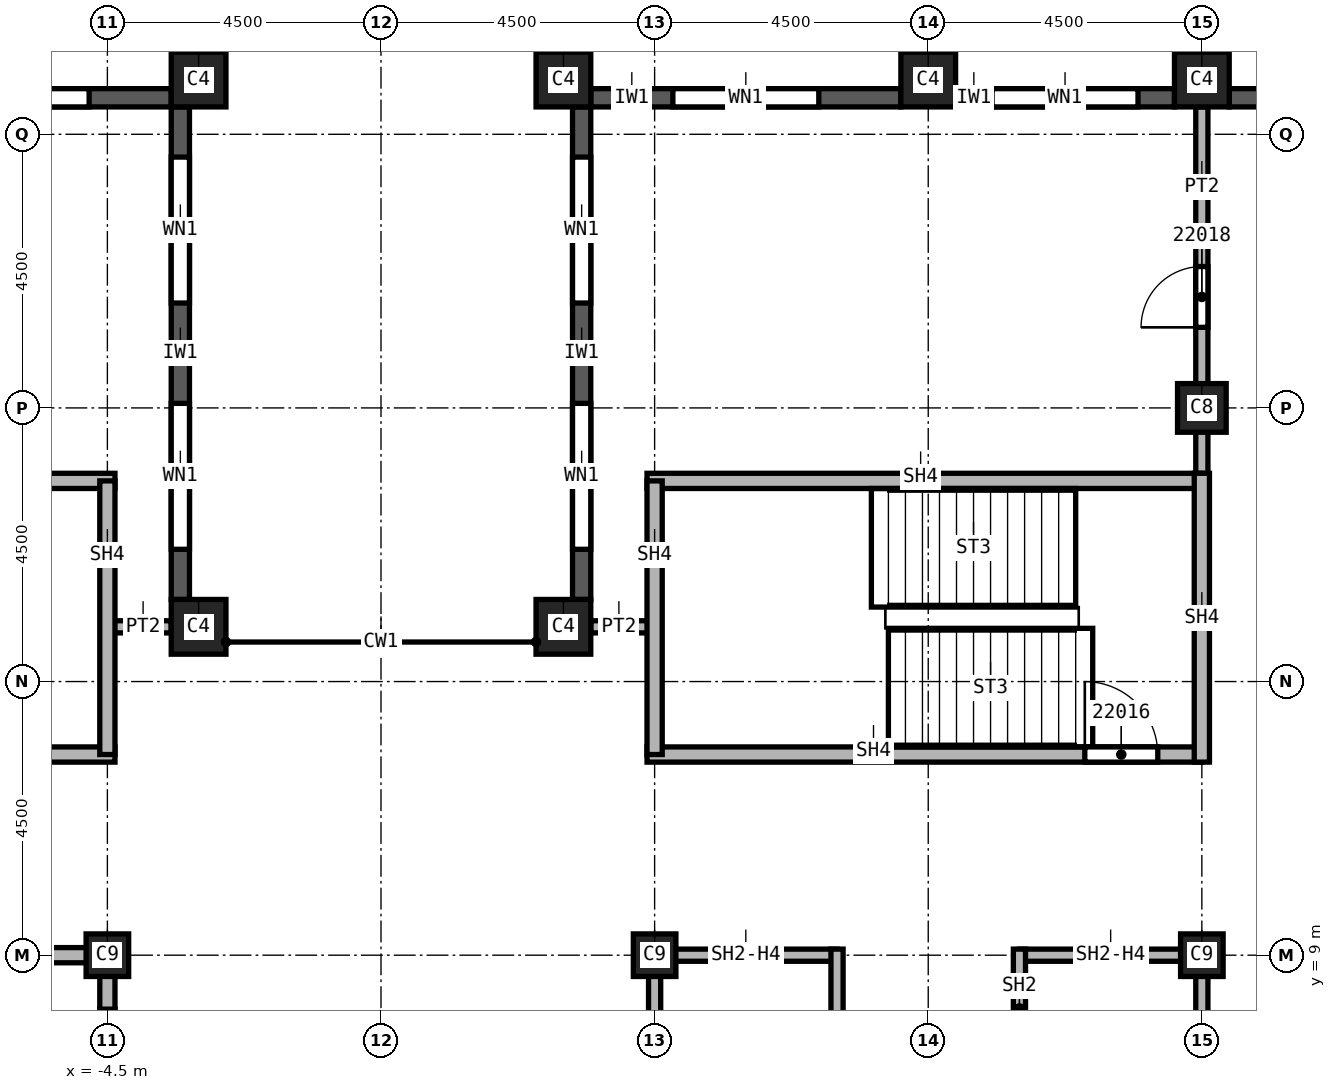
"""IFC4 building model, lengths in metres.
Left out: names, types, materials, properties, quantities, classifications, styles, units other than length and angle.
Written with IfcOpenShell. Run it as: python <this file> out.ifc"""

import sys

from ifc_helpers import new_model, si_unit, direction, frame, frame_2d, origin, origin_2d, place, context, subcontext, project, spatial, rectangle, extrude, element, fill, save


model = new_model("IFC4")
c1 = context("Model", 3, precision=1e-05, world=origin(), true_north=direction((0.0, 1.0)))
c2 = subcontext(c1, "Body", "Model", "MODEL_VIEW")
j1 = project(units=[si_unit("LENGTHUNIT", "METRE"), si_unit("PLANEANGLEUNIT", "RADIAN")], contexts=[c1])
p1 = place(None, origin())
s1 = spatial("IfcSite", under=j1, at=p1, CompositionType="ELEMENT")
p2 = place(p1, origin())
s2 = spatial("IfcBuilding", under=s1, at=p2, CompositionType="ELEMENT")
p3 = place(p2, frame((0.0, 0.0, 312.0)))
s3 = spatial("IfcBuildingStorey", under=s2, at=p3, CompositionType="ELEMENT", Elevation=312.0)
p4 = place(p3, frame((13.5, 18.0, 0.0), z_axis=(0.0, 0.0, 1.0), x_axis=(1.0, 0.0, 0.0)))
e1 = element("IfcColumn", 1, at=p4, inside=s3, PredefinedType="COLUMN", context=c2, shape_type="SweptSolid", body=[
    extrude(rectangle(XDim=0.8, YDim=0.8, at=origin_2d()), origin(), (0.0, 0.0, 1.0), 3.74),
])
for number, where, z_axis, x_axis in (
    (2, (4.5, 9.0, 0.0), (0.0, 0.0, 1.0), (1.0, 0.0, 0.0)),
    (3, (13.5, 9.0, 0.0), (0.0, 0.0, 1.0), (1.0, 0.0, 0.0)),
    (4, (-4.5, 9.0, 0.0), (0.0, 0.0, 1.0), (1.0, 0.0, 0.0)),
):
    element("IfcColumn", number, at=place(p3, frame(where, z_axis=z_axis, x_axis=x_axis)), inside=s3, PredefinedType="COLUMN", context=c2, shape_type="SweptSolid", body=[
        extrude(rectangle(XDim=0.7, YDim=0.7, at=origin_2d()), origin(), (0.0, 0.0, 1.0), 3.74),
    ])
for number, where, z_axis, x_axis in (
    (5, (3.0, 23.4, 0.0), (0.0, 0.0, 1.0), (1.0, 0.0, 0.0)),
    (6, (9.0, 23.4, 0.0), (0.0, 0.0, 1.0), (1.0, 0.0, 0.0)),
    (7, (13.5, 23.4, 0.0), (0.0, 0.0, 1.0), (1.0, 0.0, 0.0)),
    (8, (-3.0, 23.4, 0.0), (0.0, 0.0, 1.0), (1.0, 0.0, 0.0)),
    (9, (3.0, 14.4, 0.0), (0.0, 0.0, 1.0), (1.0, 0.0, 0.0)),
    (10, (-3.0, 14.4, 0.0), (0.0, 0.0, 1.0), (1.0, 0.0, 0.0)),
):
    element("IfcColumn", number, at=place(p3, frame(where, z_axis=z_axis, x_axis=x_axis)), inside=s3, PredefinedType="COLUMN", context=c2, shape_type="SweptSolid", body=[
        extrude(rectangle(XDim=0.9, YDim=0.9, at=origin_2d()), origin(), (0.0, 0.0, 1.0), 3.74),
    ])
p5 = place(p3, frame((17.55, 23.1, 0.0), z_axis=(0.0, 0.0, 1.0), x_axis=(-1.0, 0.0, 0.0)))
e11 = element("IfcWall", 11, at=p5, inside=s3, PredefinedType="SOLIDWALL", context=c2, shape_type="SweptSolid", body=[
    extrude(rectangle(XDim=3.6, YDim=0.3, at=frame_2d((1.8, 0.0))), origin(), (0.0, 0.0, 1.0), 3.14),
])
p6 = place(p5, frame((0.775, 0.0, 0.8)))
e12 = element("IfcOpeningElement", 12, at=p6, cuts=e11, PredefinedType="OPENING", context=c2, shape_type="SweptSolid", body=[
    extrude(rectangle(XDim=1.0, YDim=1.95, at=frame_2d((0.5, 0.975))), frame((0.0, 0.15, 0.0), z_axis=(0.0, -1.0, 0.0), x_axis=(1.0, 0.0, 0.0)), (0.0, 0.0, 1.0), 0.3),
])
p7 = place(p5, frame((2.375, 0.0, 0.8)))
e13 = element("IfcOpeningElement", 13, at=p7, cuts=e11, PredefinedType="OPENING", context=c2, shape_type="SweptSolid", body=[
    extrude(rectangle(XDim=0.6, YDim=1.95, at=frame_2d((0.3, 0.975))), frame((0.0, 0.15, 0.0), z_axis=(0.0, -1.0, 0.0), x_axis=(1.0, 0.0, 0.0)), (0.0, 0.0, 1.0), 0.3),
])
p8 = place(p3, frame((13.05, 23.1, 0.0), z_axis=(0.0, 0.0, 1.0), x_axis=(-1.0, 0.0, 0.0)))
e14 = element("IfcWall", 14, at=p8, inside=s3, PredefinedType="SOLIDWALL", context=c2, shape_type="SweptSolid", body=[
    extrude(rectangle(XDim=3.6, YDim=0.3, at=frame_2d((1.8, 0.0))), origin(), (0.0, 0.0, 1.0), 3.14),
])
p9 = place(p8, frame((0.6, 0.0, 0.8)))
e15 = element("IfcOpeningElement", 15, at=p9, cuts=e14, PredefinedType="OPENING", context=c2, shape_type="SweptSolid", body=[
    extrude(rectangle(XDim=2.4, YDim=1.95, at=frame_2d((1.2, 0.975))), frame((0.0, 0.15, 0.0), z_axis=(0.0, -1.0, 0.0), x_axis=(1.0, 0.0, 0.0)), (0.0, 0.0, 1.0), 0.3),
])
p10 = place(p3, frame((8.55, 23.1, 0.0), z_axis=(0.0, 0.0, 1.0), x_axis=(-1.0, 0.0, 0.0)))
e16 = element("IfcWall", 16, at=p10, inside=s3, PredefinedType="SOLIDWALL", context=c2, shape_type="SweptSolid", body=[
    extrude(rectangle(XDim=5.1, YDim=0.3, at=frame_2d((2.55, 0.0))), origin(), (0.0, 0.0, 1.0), 3.14),
])
p11 = place(p10, frame((1.35, 0.0, 0.8)))
e17 = element("IfcOpeningElement", 17, at=p11, cuts=e16, PredefinedType="OPENING", context=c2, shape_type="SweptSolid", body=[
    extrude(rectangle(XDim=2.4, YDim=1.95, at=frame_2d((1.2, 0.975))), frame((0.0, 0.15, 0.0), z_axis=(0.0, -1.0, 0.0), x_axis=(1.0, 0.0, 0.0)), (0.0, 0.0, 1.0), 0.3),
])
p12 = place(p3, frame((3.3, 22.95, 0.0), z_axis=(0.0, 0.0, 1.0), x_axis=(0.0, -1.0, 0.0)))
e18 = element("IfcWall", 18, at=p12, inside=s3, PredefinedType="SOLIDWALL", context=c2, shape_type="SweptSolid", body=[
    extrude(rectangle(XDim=8.1, YDim=0.3, at=frame_2d((4.05, 0.0))), origin(), (0.0, 0.0, 1.0), 3.14),
])
p13 = place(p12, frame((0.825, 0.0, 0.8)))
e19 = element("IfcOpeningElement", 19, at=p13, cuts=e18, PredefinedType="OPENING", context=c2, shape_type="SweptSolid", body=[
    extrude(rectangle(XDim=2.4, YDim=1.95, at=frame_2d((1.2, 0.975))), frame((0.0, 0.15, 0.0), z_axis=(0.0, -1.0, 0.0), x_axis=(1.0, 0.0, 0.0)), (0.0, 0.0, 1.0), 0.3),
])
p14 = place(p12, frame((4.875, 0.0, 0.8)))
e20 = element("IfcOpeningElement", 20, at=p14, cuts=e18, PredefinedType="OPENING", context=c2, shape_type="SweptSolid", body=[
    extrude(rectangle(XDim=2.4, YDim=1.95, at=frame_2d((1.2, 0.975))), frame((0.0, 0.15, 0.0), z_axis=(0.0, -1.0, 0.0), x_axis=(1.0, 0.0, 0.0)), (0.0, 0.0, 1.0), 0.3),
])
p15 = place(p3, frame((-3.3, 14.85, 0.0), z_axis=(0.0, 0.0, 1.0), x_axis=(0.0, 1.0, 0.0)))
e21 = element("IfcWall", 21, at=p15, inside=s3, PredefinedType="SOLIDWALL", context=c2, shape_type="SweptSolid", body=[
    extrude(rectangle(XDim=8.1, YDim=0.3, at=frame_2d((4.05, 0.0))), origin(), (0.0, 0.0, 1.0), 3.14),
])
p16 = place(p15, frame((0.825, 0.0, 0.8)))
e22 = element("IfcOpeningElement", 22, at=p16, cuts=e21, PredefinedType="OPENING", context=c2, shape_type="SweptSolid", body=[
    extrude(rectangle(XDim=2.4, YDim=1.95, at=frame_2d((1.2, 0.975))), frame((0.0, 0.15, 0.0), z_axis=(0.0, -1.0, 0.0), x_axis=(1.0, 0.0, 0.0)), (0.0, 0.0, 1.0), 0.3),
])
p17 = place(p15, frame((4.875, 0.0, 0.8)))
e23 = element("IfcOpeningElement", 23, at=p17, cuts=e21, PredefinedType="OPENING", context=c2, shape_type="SweptSolid", body=[
    extrude(rectangle(XDim=2.4, YDim=1.95, at=frame_2d((1.2, 0.975))), frame((0.0, 0.15, 0.0), z_axis=(0.0, -1.0, 0.0), x_axis=(1.0, 0.0, 0.0)), (0.0, 0.0, 1.0), 0.3),
])
p18 = place(p3, frame((-3.45, 23.1, 0.0), z_axis=(0.0, 0.0, 1.0), x_axis=(-1.0, 0.0, 0.0)))
e24 = element("IfcWall", 24, at=p18, inside=s3, PredefinedType="SOLIDWALL", context=c2, shape_type="SweptSolid", body=[
    extrude(rectangle(XDim=5.1, YDim=0.3, at=frame_2d((2.55, 0.0))), origin(), (0.0, 0.0, 1.0), 3.14),
])
p19 = place(p18, frame((1.35, 0.0, 0.8)))
e25 = element("IfcOpeningElement", 25, at=p19, cuts=e24, PredefinedType="OPENING", context=c2, shape_type="SweptSolid", body=[
    extrude(rectangle(XDim=2.4, YDim=1.95, at=frame_2d((1.2, 0.975))), frame((0.0, 0.15, 0.0), z_axis=(0.0, -1.0, 0.0), x_axis=(1.0, 0.0, 0.0)), (0.0, 0.0, 1.0), 0.3),
])
for number, where, z_axis, x_axis in (
    (26, (-4.5, 14.4, 0.0), (0.0, 0.0, 1.0), (1.0, 0.0, 0.0)),
    (27, (3.45, 14.4, 0.0), (0.0, 0.0, 1.0), (1.0, 0.0, 0.0)),
):
    element("IfcWall", number, at=place(p3, frame(where, z_axis=z_axis, x_axis=x_axis)), inside=s3, PredefinedType="PARTITIONING", context=c2, shape_type="SweptSolid", body=[
        extrude(rectangle(XDim=1.05, YDim=0.2, at=frame_2d((0.525, 0.0))), origin(), (0.0, 0.0, 1.0), 3.74),
    ])
p20 = place(p3, frame((13.5, 16.675, 0.0), z_axis=(0.0, 0.0, 1.0), x_axis=(0.0, 1.0, 0.0)))
e28 = element("IfcWall", 28, at=p20, inside=s3, PredefinedType="PARTITIONING", context=c2, shape_type="SweptSolid", body=[
    extrude(rectangle(XDim=6.275, YDim=0.2, at=frame_2d((3.137, 0.0))), origin(), (0.0, 0.0, 1.0), 3.74),
])
p21 = place(p20, frame((2.65, 0.0, 0.0)))
e29 = element("IfcOpeningElement", 29, at=p21, cuts=e28, PredefinedType="OPENING", context=c2, shape_type="SweptSolid", body=[
    extrude(rectangle(XDim=1.0, YDim=2.1, at=frame_2d((0.5, 1.05))), frame((0.0, 0.1, 0.0), z_axis=(0.0, -1.0, 0.0), x_axis=(1.0, 0.0, 0.0)), (0.0, 0.0, 1.0), 0.2),
])
p22 = place(p3, frame((4.5, -6.0, 0.0), z_axis=(0.0, 0.0, 1.0), x_axis=(0.0, 1.0, 0.0)))
e30 = element("IfcWall", 30, at=p22, inside=s3, PredefinedType="SOLIDWALL", context=c2, shape_type="SweptSolid", body=[
    extrude(rectangle(XDim=15.1, YDim=0.2, at=frame_2d((7.55, 0.0))), origin(), (0.0, 0.0, 1.0), 3.062),
])
p23 = place(p22, frame((3.1, 0.0, 0.0)))
e31 = element("IfcOpeningElement", 31, at=p23, cuts=e30, PredefinedType="OPENING", context=c2, shape_type="SweptSolid", body=[
    extrude(rectangle(XDim=1.1, YDim=2.1, at=frame_2d((0.55, 1.05))), frame((0.0, 0.1, 0.0), z_axis=(0.0, -1.0, 0.0), x_axis=(1.0, 0.0, 0.0)), (0.0, 0.0, 1.0), 0.2),
])
p24 = place(p22, frame((9.7, 0.0, 0.0)))
e32 = element("IfcOpeningElement", 32, at=p24, cuts=e30, PredefinedType="OPENING", context=c2, shape_type="SweptSolid", body=[
    extrude(rectangle(XDim=1.1, YDim=2.1, at=frame_2d((0.55, 1.05))), frame((0.0, 0.1, 0.0), z_axis=(0.0, -1.0, 0.0), x_axis=(1.0, 0.0, 0.0)), (0.0, 0.0, 1.0), 0.2),
])
p25 = place(p3, frame((4.5, 9.0, 0.0), z_axis=(0.0, 0.0, 1.0), x_axis=(1.0, 0.0, 0.0)))
e33 = element("IfcWall", 33, at=p25, inside=s3, PredefinedType="SOLIDWALL", context=c2, shape_type="SweptSolid", body=[
    extrude(rectangle(XDim=3.0, YDim=0.2, at=frame_2d((1.5, 0.0))), origin(), (0.0, 0.0, 1.0), 3.062),
])
p26 = place(p3, frame((7.5, 9.1, 0.0), z_axis=(0.0, 0.0, 1.0), x_axis=(0.0, -1.0, 0.0)))
e34 = element("IfcWall", 34, at=p26, inside=s3, PredefinedType="SOLIDWALL", context=c2, shape_type="SweptSolid", body=[
    extrude(rectangle(XDim=6.225, YDim=0.2, at=frame_2d((3.113, 0.0))), origin(), (0.0, 0.0, 1.0), 3.74),
])
p27 = place(p3, frame((10.5, 9.0, 0.0), z_axis=(0.0, 0.0, 1.0), x_axis=(1.0, 0.0, 0.0)))
e35 = element("IfcWall", 35, at=p27, inside=s3, PredefinedType="SOLIDWALL", context=c2, shape_type="SweptSolid", body=[
    extrude(rectangle(XDim=3.0, YDim=0.2, at=frame_2d((1.5, 0.0))), origin(), (0.0, 0.0, 1.0), 3.062),
])
p28 = place(p3, frame((10.5, 9.1, 0.0), z_axis=(0.0, 0.0, 1.0), x_axis=(0.0, -1.0, 0.0)))
e36 = element("IfcWall", 36, at=p28, inside=s3, PredefinedType="SOLIDWALL", context=c2, shape_type="SweptSolid", body=[
    extrude(rectangle(XDim=3.225, YDim=0.2, at=frame_2d((1.613, 0.0))), origin(), (0.0, 0.0, 1.0), 3.74),
])
p29 = place(p28, frame((1.75, 0.0, 0.0)))
e37 = element("IfcOpeningElement", 37, at=p29, cuts=e36, PredefinedType="OPENING", context=c2, shape_type="SweptSolid", body=[
    extrude(rectangle(XDim=1.1, YDim=2.1, at=frame_2d((0.55, 1.05))), frame((0.0, 0.1, 0.0), z_axis=(0.0, -1.0, 0.0), x_axis=(1.0, 0.0, 0.0)), (0.0, 0.0, 1.0), 0.2),
])
p30 = place(p3, frame((13.5, 9.1, 0.0), z_axis=(0.0, 0.0, 1.0), x_axis=(0.0, -1.0, 0.0)))
e38 = element("IfcWall", 38, at=p30, inside=s3, PredefinedType="SOLIDWALL", context=c2, shape_type="SweptSolid", body=[
    extrude(rectangle(XDim=3.1, YDim=0.2, at=frame_2d((1.55, 0.0))), origin(), (0.0, 0.0, 1.0), 3.062),
])
p31 = place(p3, frame((-7.5, 9.0, 0.0), z_axis=(0.0, 0.0, 1.0), x_axis=(1.0, 0.0, 0.0)))
e39 = element("IfcWall", 39, at=p31, inside=s3, PredefinedType="SOLIDWALL", context=c2, shape_type="SweptSolid", body=[
    extrude(rectangle(XDim=3.0, YDim=0.25, at=frame_2d((1.5, 0.0))), origin(), (0.0, 0.0, 1.0), 3.062),
])
p32 = place(p3, frame((-4.5, 9.125, 0.0), z_axis=(0.0, 0.0, 1.0), x_axis=(0.0, -1.0, 0.0)))
e40 = element("IfcWall", 40, at=p32, inside=s3, PredefinedType="SOLIDWALL", context=c2, shape_type="SweptSolid", body=[
    extrude(rectangle(XDim=3.125, YDim=0.25, at=frame_2d((1.562, 0.0))), origin(), (0.0, 0.0, 1.0), 3.062),
])
p33 = place(p32, frame((1.012, 0.0, 0.0)))
e41 = element("IfcOpeningElement", 41, at=p33, cuts=e40, PredefinedType="OPENING", context=c2, shape_type="SweptSolid", body=[
    extrude(rectangle(XDim=1.1, YDim=2.1, at=frame_2d((0.55, 1.05))), frame((0.0, 0.125, 0.0), z_axis=(0.0, -1.0, 0.0), x_axis=(1.0, 0.0, 0.0)), (0.0, 0.0, 1.0), 0.25),
])
p34 = place(p3, frame((-13.5, 12.3, 0.0), z_axis=(0.0, 0.0, 1.0), x_axis=(1.0, 0.0, 0.0)))
e42 = element("IfcWall", 42, at=p34, inside=s3, PredefinedType="SOLIDWALL", context=c2, shape_type="SweptSolid", body=[
    extrude(rectangle(XDim=9.125, YDim=0.25, at=frame_2d((4.562, 0.0))), origin(), (0.0, 0.0, 1.0), 3.74),
])
p35 = place(p34, frame((0.6, 0.0, 0.0)))
e43 = element("IfcOpeningElement", 43, at=p35, cuts=e42, PredefinedType="OPENING", context=c2, shape_type="SweptSolid", body=[
    extrude(rectangle(XDim=1.2, YDim=2.1, at=frame_2d((0.6, 1.05))), frame((0.0, 0.125, 0.0), z_axis=(0.0, -1.0, 0.0), x_axis=(1.0, 0.0, 0.0)), (0.0, 0.0, 1.0), 0.25),
])
p36 = place(p3, frame((-13.5, 16.8, 0.0), z_axis=(0.0, 0.0, 1.0), x_axis=(1.0, 0.0, 0.0)))
e44 = element("IfcWall", 44, at=p36, inside=s3, PredefinedType="SOLIDWALL", context=c2, shape_type="SweptSolid", body=[
    extrude(rectangle(XDim=9.125, YDim=0.25, at=frame_2d((4.562, 0.0))), origin(), (0.0, 0.0, 1.0), 3.74),
])
p37 = place(p3, frame((-4.5, 16.8, 0.0), z_axis=(0.0, 0.0, 1.0), x_axis=(0.0, -1.0, 0.0)))
e45 = element("IfcWall", 45, at=p37, inside=s3, PredefinedType="SOLIDWALL", context=c2, shape_type="SweptSolid", body=[
    extrude(rectangle(XDim=4.5, YDim=0.25, at=frame_2d((2.25, 0.0))), origin(), (0.0, 0.0, 1.0), 3.74),
])
p38 = place(p3, frame((4.375, 12.3, 0.0), z_axis=(0.0, 0.0, 1.0), x_axis=(1.0, 0.0, 0.0)))
e46 = element("IfcWall", 46, at=p38, inside=s3, PredefinedType="SOLIDWALL", context=c2, shape_type="SweptSolid", body=[
    extrude(rectangle(XDim=9.125, YDim=0.25, at=frame_2d((4.562, 0.0))), origin(), (0.0, 0.0, 1.0), 3.74),
])
p39 = place(p38, frame((7.2, 0.0, 0.0)))
e47 = element("IfcOpeningElement", 47, at=p39, cuts=e46, PredefinedType="OPENING", context=c2, shape_type="SweptSolid", body=[
    extrude(rectangle(XDim=1.2, YDim=2.1, at=frame_2d((0.6, 1.05))), frame((0.0, 0.125, 0.0), z_axis=(0.0, -1.0, 0.0), x_axis=(1.0, 0.0, 0.0)), (0.0, 0.0, 1.0), 0.25),
])
p40 = place(p3, frame((4.375, 16.8, 0.0), z_axis=(0.0, 0.0, 1.0), x_axis=(1.0, 0.0, 0.0)))
e48 = element("IfcWall", 48, at=p40, inside=s3, PredefinedType="SOLIDWALL", context=c2, shape_type="SweptSolid", body=[
    extrude(rectangle(XDim=9.125, YDim=0.25, at=frame_2d((4.562, 0.0))), origin(), (0.0, 0.0, 1.0), 3.74),
])
p41 = place(p3, frame((4.5, 12.3, 0.0), z_axis=(0.0, 0.0, 1.0), x_axis=(0.0, 1.0, 0.0)))
e49 = element("IfcWall", 49, at=p41, inside=s3, PredefinedType="SOLIDWALL", context=c2, shape_type="SweptSolid", body=[
    extrude(rectangle(XDim=4.5, YDim=0.25, at=frame_2d((2.25, 0.0))), origin(), (0.0, 0.0, 1.0), 3.74),
])
p42 = place(p3, frame((13.5, 12.175, 0.0), z_axis=(0.0, 0.0, 1.0), x_axis=(0.0, 1.0, 0.0)))
e50 = element("IfcWall", 50, at=p42, inside=s3, PredefinedType="SOLIDWALL", context=c2, shape_type="SweptSolid", body=[
    extrude(rectangle(XDim=4.75, YDim=0.25, at=frame_2d((2.375, 0.0))), origin(), (0.0, 0.0, 1.0), 3.74),
])
p43 = place(p9, origin())
e51 = element("IfcWindow", 51, at=p43, inside=s3, PartitioningType="SINGLE_PANEL", PredefinedType="WINDOW", context=c2, shape_type="SweptSolid", body=[
    extrude(rectangle(XDim=2.4, YDim=1.95, at=frame_2d((1.2, 0.975))), frame((0.0, 0.03, 0.0), z_axis=(0.0, -1.0, 0.0), x_axis=(1.0, 0.0, 0.0)), (0.0, 0.0, 1.0), 0.06),
])
fill(e15, e51)
p44 = place(p11, origin())
e52 = element("IfcWindow", 52, at=p44, inside=s3, PartitioningType="SINGLE_PANEL", PredefinedType="WINDOW", context=c2, shape_type="SweptSolid", body=[
    extrude(rectangle(XDim=2.4, YDim=1.95, at=frame_2d((1.2, 0.975))), frame((0.0, 0.03, 0.0), z_axis=(0.0, -1.0, 0.0), x_axis=(1.0, 0.0, 0.0)), (0.0, 0.0, 1.0), 0.06),
])
fill(e17, e52)
p45 = place(p13, origin())
e53 = element("IfcWindow", 53, at=p45, inside=s3, PartitioningType="SINGLE_PANEL", PredefinedType="WINDOW", context=c2, shape_type="SweptSolid", body=[
    extrude(rectangle(XDim=2.4, YDim=1.95, at=frame_2d((1.2, 0.975))), frame((0.0, 0.03, 0.0), z_axis=(0.0, -1.0, 0.0), x_axis=(1.0, 0.0, 0.0)), (0.0, 0.0, 1.0), 0.06),
])
fill(e19, e53)
p46 = place(p14, origin())
e54 = element("IfcWindow", 54, at=p46, inside=s3, PartitioningType="SINGLE_PANEL", PredefinedType="WINDOW", context=c2, shape_type="SweptSolid", body=[
    extrude(rectangle(XDim=2.4, YDim=1.95, at=frame_2d((1.2, 0.975))), frame((0.0, 0.03, 0.0), z_axis=(0.0, -1.0, 0.0), x_axis=(1.0, 0.0, 0.0)), (0.0, 0.0, 1.0), 0.06),
])
fill(e20, e54)
p47 = place(p16, origin())
e55 = element("IfcWindow", 55, at=p47, inside=s3, PartitioningType="SINGLE_PANEL", PredefinedType="WINDOW", context=c2, shape_type="SweptSolid", body=[
    extrude(rectangle(XDim=2.4, YDim=1.95, at=frame_2d((1.2, 0.975))), frame((0.0, 0.03, 0.0), z_axis=(0.0, -1.0, 0.0), x_axis=(1.0, 0.0, 0.0)), (0.0, 0.0, 1.0), 0.06),
])
fill(e22, e55)
p48 = place(p17, origin())
e56 = element("IfcWindow", 56, at=p48, inside=s3, PartitioningType="SINGLE_PANEL", PredefinedType="WINDOW", context=c2, shape_type="SweptSolid", body=[
    extrude(rectangle(XDim=2.4, YDim=1.95, at=frame_2d((1.2, 0.975))), frame((0.0, 0.03, 0.0), z_axis=(0.0, -1.0, 0.0), x_axis=(1.0, 0.0, 0.0)), (0.0, 0.0, 1.0), 0.06),
])
fill(e23, e56)
p49 = place(p19, origin())
e57 = element("IfcWindow", 57, at=p49, inside=s3, PartitioningType="SINGLE_PANEL", PredefinedType="WINDOW", context=c2, shape_type="SweptSolid", body=[
    extrude(rectangle(XDim=2.4, YDim=1.95, at=frame_2d((1.2, 0.975))), frame((0.0, 0.03, 0.0), z_axis=(0.0, -1.0, 0.0), x_axis=(1.0, 0.0, 0.0)), (0.0, 0.0, 1.0), 0.06),
])
fill(e25, e57)
p50 = place(p39, origin())
e58 = element("IfcDoor", 58, at=p50, inside=s3, OperationType="SINGLE_SWING_LEFT", PredefinedType="DOOR", context=c2, shape_type="SweptSolid", body=[
    extrude(rectangle(XDim=1.2, YDim=2.1, at=frame_2d((0.6, 1.05))), frame((0.0, 0.025, 0.0), z_axis=(0.0, -1.0, 0.0), x_axis=(1.0, 0.0, 0.0)), (0.0, 0.0, 1.0), 0.05),
])
fill(e47, e58)
p51 = place(p21, origin())
e59 = element("IfcDoor", 59, at=p51, inside=s3, OperationType="SINGLE_SWING_LEFT", PredefinedType="DOOR", context=c2, shape_type="SweptSolid", body=[
    extrude(rectangle(XDim=1.0, YDim=2.1, at=frame_2d((0.5, 1.05))), frame((0.0, 0.025, 0.0), z_axis=(0.0, -1.0, 0.0), x_axis=(1.0, 0.0, 0.0)), (0.0, 0.0, 1.0), 0.05),
])
fill(e29, e59)
p52 = place(p33, origin())
e60 = element("IfcDoor", 60, at=p52, inside=s3, OperationType="SLIDING_TO_LEFT", PredefinedType="DOOR", context=c2, shape_type="SweptSolid", body=[
    extrude(rectangle(XDim=1.1, YDim=2.1, at=frame_2d((0.55, 1.05))), frame((0.0, 0.025, 0.0), z_axis=(0.0, -1.0, 0.0), x_axis=(1.0, 0.0, 0.0)), (0.0, 0.0, 1.0), 0.05),
])
fill(e41, e60)
save(model, sys.argv[1])
